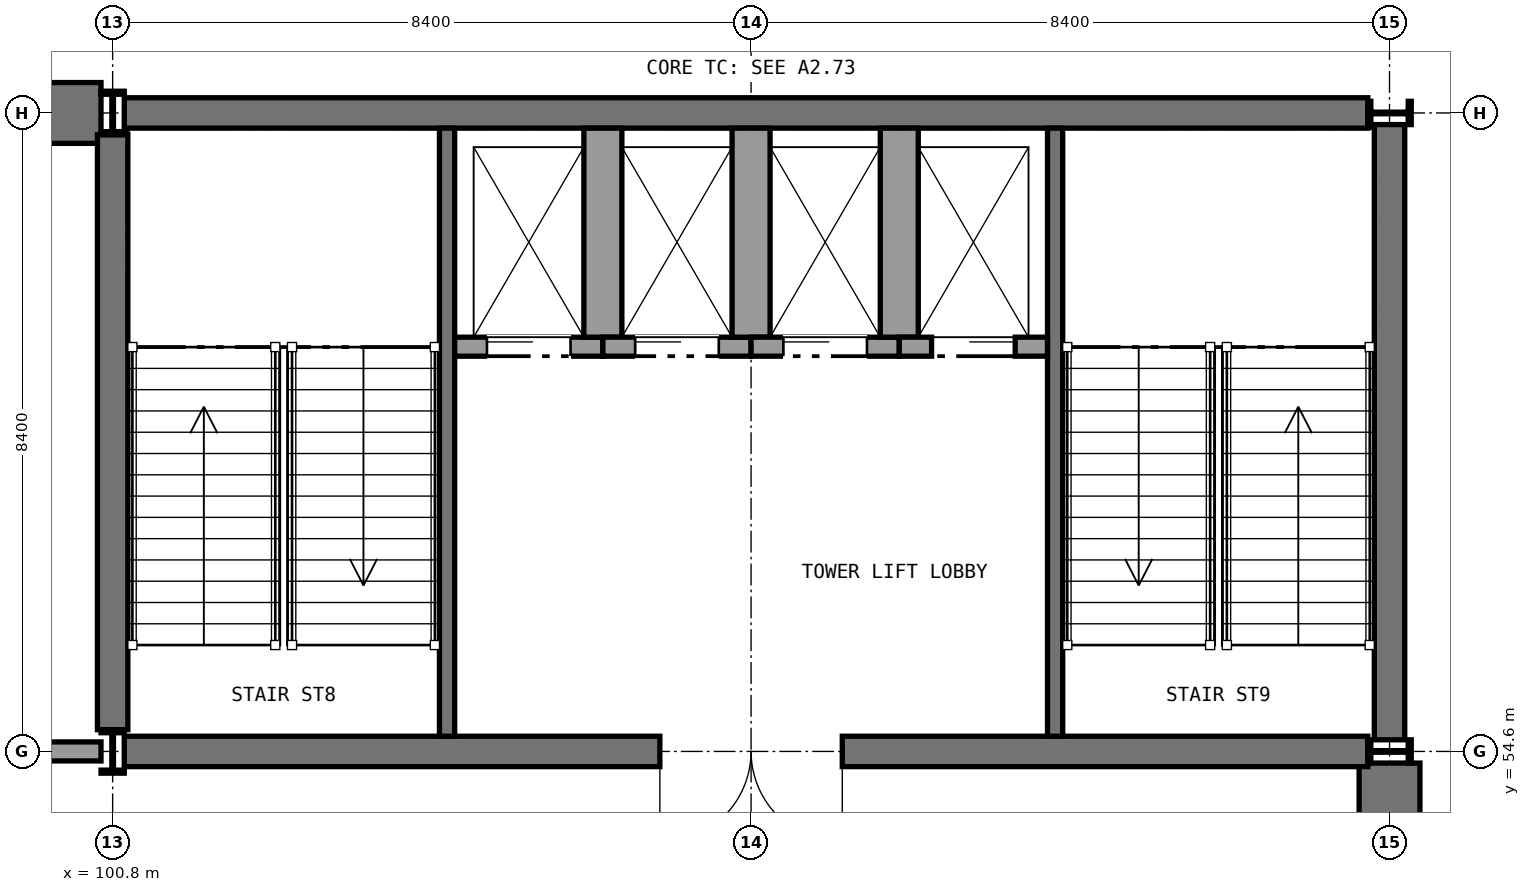
"""IFC4 building model, lengths in metres.
Left out: names, types, materials, properties, quantities, classifications, styles, units other than length and angle.
Written with IfcOpenShell. Run it as: python <this file> out.ifc"""

import sys

from ifc_helpers import new_model, si_unit, direction, frame, frame_2d, origin, origin_2d, place, context, subcontext, project, spatial, rectangle, i_section, extrude, element, fill, save


model = new_model("IFC4")
c1 = context("Model", 3, precision=1e-05, world=origin(), true_north=direction((0.0, 1.0)))
c2 = subcontext(c1, "Body", "Model", "MODEL_VIEW")
j1 = project(units=[si_unit("LENGTHUNIT", "METRE"), si_unit("PLANEANGLEUNIT", "RADIAN")], contexts=[c1])
p1 = place(None, origin())
s1 = spatial("IfcSite", under=j1, at=p1, CompositionType="ELEMENT")
p2 = place(p1, origin())
s2 = spatial("IfcBuilding", under=s1, at=p2, CompositionType="ELEMENT")
p3 = place(p2, frame((0.0, 0.0, -9.9)))
s3 = spatial("IfcBuildingStorey", under=s2, at=p3, CompositionType="ELEMENT", Elevation=-9.9)
for number, where, z_axis, x_axis in (
    (1, (92.4, 63.0, 0.0), (0.0, 0.0, 1.0), (1.0, 0.0, 0.0)),
    (2, (117.6, 46.2, 0.0), (0.0, 0.0, 1.0), (0.0, 1.0, 0.0)),
):
    element("IfcWall", number, at=place(p3, frame(where, z_axis=z_axis, x_axis=x_axis)), inside=s3, PredefinedType="SOLIDWALL", context=c2, shape_type="SweptSolid", body=[
        extrude(rectangle(XDim=8.247, YDim=0.8, at=frame_2d((4.124, 0.0))), origin(), (0.0, 0.0, 1.0), 4.65),
    ])
p4 = place(p3, frame((100.953, 63.0, 0.0), z_axis=(0.0, 0.0, 1.0), x_axis=(1.0, 0.0, 0.0)))
e3 = element("IfcWall", 3, at=p4, inside=s3, PredefinedType="SHEAR", context=c2, shape_type="SweptSolid", body=[
    extrude(rectangle(XDim=16.361, YDim=0.4, at=frame_2d((8.181, 0.0))), origin(), (0.0, 0.0, 1.0), 4.65),
])
p5 = place(p3, frame((100.953, 54.6, 0.0), z_axis=(0.0, 0.0, 1.0), x_axis=(1.0, 0.0, 0.0)))
e4 = element("IfcWall", 4, at=p5, inside=s3, PredefinedType="SHEAR", context=c2, shape_type="SweptSolid", body=[
    extrude(rectangle(XDim=16.361, YDim=0.4, at=frame_2d((8.181, 0.0))), origin(), (0.0, 0.0, 1.0), 4.65),
])
p6 = place(p5, frame((7.047, 0.0, 0.0)))
e5 = element("IfcOpeningElement", 5, at=p6, cuts=e4, PredefinedType="OPENING", context=c2, shape_type="SweptSolid", body=[
    extrude(rectangle(XDim=2.4, YDim=2.4, at=frame_2d((1.2, 1.2))), frame((0.0, 0.21, 0.0), z_axis=(0.0, -1.0, 0.0), x_axis=(1.0, 0.0, 0.0)), (0.0, 0.0, 1.0), 0.42),
])
p7 = place(p3, frame((100.8, 54.886, 0.0), z_axis=(0.0, 0.0, 1.0), x_axis=(0.0, 1.0, 0.0)))
e6 = element("IfcWall", 6, at=p7, inside=s3, PredefinedType="SHEAR", context=c2, shape_type="SweptSolid", body=[
    extrude(rectangle(XDim=7.828, YDim=0.4, at=frame_2d((3.914, 0.0))), origin(), (0.0, 0.0, 1.0), 4.65),
])
p8 = place(p3, frame((117.6, 54.753, 0.0), z_axis=(0.0, 0.0, 1.0), x_axis=(0.0, 1.0, 0.0)))
e7 = element("IfcWall", 7, at=p8, inside=s3, PredefinedType="SHEAR", context=c2, shape_type="SweptSolid", body=[
    extrude(rectangle(XDim=8.094, YDim=0.4, at=frame_2d((4.047, 0.0))), origin(), (0.0, 0.0, 1.0), 4.65),
])
for number, where, z_axis, x_axis in (
    (8, (100.8, 54.6, 0.0), (0.0, 0.0, 1.0), (1.0, 0.0, 0.0)),
    (9, (100.8, 63.0, 0.0), (0.0, 0.0, 1.0), (1.0, 0.0, 0.0)),
    (10, (117.6, 54.6, 0.0), (0.0, 0.0, 1.0), (0.0, 1.0, 0.0)),
    (11, (117.6, 63.0, 0.0), (0.0, 0.0, 1.0), (0.0, 1.0, 0.0)),
):
    element("IfcColumn", number, at=place(p3, frame(where, z_axis=z_axis, x_axis=x_axis)), inside=s3, PredefinedType="COLUMN", context=c2, shape_type="SweptSolid", body=[
        extrude(i_section(OverallWidth=0.306, OverallDepth=0.572, WebThickness=0.021, FlangeThickness=0.04, FilletRadius=0.027, at=origin_2d()), origin(), (0.0, 0.0, 1.0), 5.0),
    ])
p9 = place(p3, frame((92.553, 54.6, 0.0), z_axis=(0.0, 0.0, 1.0), x_axis=(1.0, 0.0, 0.0)))
e12 = element("IfcWall", 12, at=p9, inside=s3, PredefinedType="SOLIDWALL", context=c2, shape_type="SweptSolid", body=[
    extrude(rectangle(XDim=8.094, YDim=0.25, at=frame_2d((4.047, 0.0))), origin(), (0.0, 0.0, 1.0), 4.65),
])
p10 = place(p9, frame((3.35, 0.0, 0.0)))
e13 = element("IfcOpeningElement", 13, at=p10, cuts=e12, PredefinedType="OPENING", context=c2, shape_type="SweptSolid", body=[
    extrude(rectangle(XDim=1.6, YDim=2.2, at=frame_2d((0.8, 1.1))), frame((0.0, 0.135, 0.0), z_axis=(0.0, -1.0, 0.0), x_axis=(1.0, 0.0, 0.0)), (0.0, 0.0, 1.0), 0.27),
])
for number, where, z_axis, x_axis in (
    (14, (105.2, 62.8, 0.0), (0.0, 0.0, 1.0), (0.0, -1.0, 0.0)),
    (15, (113.2, 62.8, 0.0), (0.0, 0.0, 1.0), (0.0, -1.0, 0.0)),
):
    element("IfcWall", number, at=place(p3, frame(where, z_axis=z_axis, x_axis=x_axis)), inside=s3, PredefinedType="SHEAR", context=c2, shape_type="SweptSolid", body=[
        extrude(rectangle(XDim=8.0, YDim=0.2, at=frame_2d((4.0, 0.0))), origin(), (0.0, 0.0, 1.0), 4.65),
    ])
p11 = place(p3, frame((105.3, 59.925, -1.4), z_axis=(0.0, 0.0, 1.0), x_axis=(1.0, 0.0, 0.0)))
e16 = element("IfcWall", 16, at=p11, inside=s3, PredefinedType="SOLIDWALL", context=c2, shape_type="SweptSolid", body=[
    extrude(rectangle(XDim=1.95, YDim=0.25, at=frame_2d((0.975, 0.0))), origin(), (0.0, 0.0, 1.0), 6.4),
])
p12 = place(p11, frame((0.425, 0.0, 1.4)))
e17 = element("IfcOpeningElement", 17, at=p12, cuts=e16, PredefinedType="OPENING", context=c2, shape_type="SweptSolid", body=[
    extrude(rectangle(XDim=1.1, YDim=2.1, at=frame_2d((0.55, 1.05))), frame((0.0, 0.135, 0.0), z_axis=(0.0, -1.0, 0.0), x_axis=(1.0, 0.0, 0.0)), (0.0, 0.0, 1.0), 0.27),
])
p13 = place(p3, frame((107.25, 62.8, -1.4), z_axis=(0.0, 0.0, 1.0), x_axis=(0.0, -1.0, 0.0)))
e18 = element("IfcWall", 18, at=p13, inside=s3, PredefinedType="SOLIDWALL", context=c2, shape_type="SweptSolid", body=[
    extrude(rectangle(XDim=2.75, YDim=0.5, at=frame_2d((1.375, 0.0))), origin(), (0.0, 0.0, 1.0), 6.4),
])
p14 = place(p3, frame((107.25, 59.925, -1.4), z_axis=(0.0, 0.0, 1.0), x_axis=(1.0, 0.0, 0.0)))
e19 = element("IfcWall", 19, at=p14, inside=s3, PredefinedType="SOLIDWALL", context=c2, shape_type="SweptSolid", body=[
    extrude(rectangle(XDim=1.95, YDim=0.25, at=frame_2d((0.975, 0.0))), origin(), (0.0, 0.0, 1.0), 6.4),
])
p15 = place(p14, frame((0.425, 0.0, 1.4)))
e20 = element("IfcOpeningElement", 20, at=p15, cuts=e19, PredefinedType="OPENING", context=c2, shape_type="SweptSolid", body=[
    extrude(rectangle(XDim=1.1, YDim=2.1, at=frame_2d((0.55, 1.05))), frame((0.0, 0.135, 0.0), z_axis=(0.0, -1.0, 0.0), x_axis=(1.0, 0.0, 0.0)), (0.0, 0.0, 1.0), 0.27),
])
p16 = place(p3, frame((109.2, 62.8, -1.4), z_axis=(0.0, 0.0, 1.0), x_axis=(0.0, -1.0, 0.0)))
e21 = element("IfcWall", 21, at=p16, inside=s3, PredefinedType="SOLIDWALL", context=c2, shape_type="SweptSolid", body=[
    extrude(rectangle(XDim=2.75, YDim=0.5, at=frame_2d((1.375, 0.0))), origin(), (0.0, 0.0, 1.0), 6.4),
])
p17 = place(p3, frame((109.2, 59.925, -1.4), z_axis=(0.0, 0.0, 1.0), x_axis=(1.0, 0.0, 0.0)))
e22 = element("IfcWall", 22, at=p17, inside=s3, PredefinedType="SOLIDWALL", context=c2, shape_type="SweptSolid", body=[
    extrude(rectangle(XDim=1.95, YDim=0.25, at=frame_2d((0.975, 0.0))), origin(), (0.0, 0.0, 1.0), 6.4),
])
p18 = place(p17, frame((0.425, 0.0, 1.4)))
e23 = element("IfcOpeningElement", 23, at=p18, cuts=e22, PredefinedType="OPENING", context=c2, shape_type="SweptSolid", body=[
    extrude(rectangle(XDim=1.1, YDim=2.1, at=frame_2d((0.55, 1.05))), frame((0.0, 0.135, 0.0), z_axis=(0.0, -1.0, 0.0), x_axis=(1.0, 0.0, 0.0)), (0.0, 0.0, 1.0), 0.27),
])
p19 = place(p3, frame((111.15, 62.8, -1.4), z_axis=(0.0, 0.0, 1.0), x_axis=(0.0, -1.0, 0.0)))
e24 = element("IfcWall", 24, at=p19, inside=s3, PredefinedType="SOLIDWALL", context=c2, shape_type="SweptSolid", body=[
    extrude(rectangle(XDim=2.75, YDim=0.5, at=frame_2d((1.375, 0.0))), origin(), (0.0, 0.0, 1.0), 6.4),
])
p20 = place(p3, frame((111.15, 59.925, -1.4), z_axis=(0.0, 0.0, 1.0), x_axis=(1.0, 0.0, 0.0)))
e25 = element("IfcWall", 25, at=p20, inside=s3, PredefinedType="SOLIDWALL", context=c2, shape_type="SweptSolid", body=[
    extrude(rectangle(XDim=1.95, YDim=0.25, at=frame_2d((0.975, 0.0))), origin(), (0.0, 0.0, 1.0), 6.4),
])
p21 = place(p20, frame((0.425, 0.0, 1.4)))
e26 = element("IfcOpeningElement", 26, at=p21, cuts=e25, PredefinedType="OPENING", context=c2, shape_type="SweptSolid", body=[
    extrude(rectangle(XDim=1.1, YDim=2.1, at=frame_2d((0.55, 1.05))), frame((0.0, 0.135, 0.0), z_axis=(0.0, -1.0, 0.0), x_axis=(1.0, 0.0, 0.0)), (0.0, 0.0, 1.0), 0.27),
])
p22 = place(p12, frame((1.1, 0.0, 0.0), z_axis=(0.0, 0.0, 1.0), x_axis=(-1.0, 0.0, 0.0)))
e27 = element("IfcDoor", 27, at=p22, inside=s3, OperationType="SLIDING_TO_RIGHT", PredefinedType="DOOR", context=c2, shape_type="SweptSolid", body=[
    extrude(rectangle(XDim=1.1, YDim=2.1, at=frame_2d((0.55, 1.05))), frame((0.0, 0.025, 0.0), z_axis=(0.0, -1.0, 0.0), x_axis=(1.0, 0.0, 0.0)), (0.0, 0.0, 1.0), 0.05),
])
fill(e17, e27)
p23 = place(p15, frame((1.1, 0.0, 0.0), z_axis=(0.0, 0.0, 1.0), x_axis=(-1.0, 0.0, 0.0)))
e28 = element("IfcDoor", 28, at=p23, inside=s3, OperationType="SLIDING_TO_RIGHT", PredefinedType="DOOR", context=c2, shape_type="SweptSolid", body=[
    extrude(rectangle(XDim=1.1, YDim=2.1, at=frame_2d((0.55, 1.05))), frame((0.0, 0.025, 0.0), z_axis=(0.0, -1.0, 0.0), x_axis=(1.0, 0.0, 0.0)), (0.0, 0.0, 1.0), 0.05),
])
fill(e20, e28)
p24 = place(p18, frame((1.1, 0.0, 0.0), z_axis=(0.0, 0.0, 1.0), x_axis=(-1.0, 0.0, 0.0)))
e29 = element("IfcDoor", 29, at=p24, inside=s3, OperationType="SLIDING_TO_RIGHT", PredefinedType="DOOR", context=c2, shape_type="SweptSolid", body=[
    extrude(rectangle(XDim=1.1, YDim=2.1, at=frame_2d((0.55, 1.05))), frame((0.0, 0.025, 0.0), z_axis=(0.0, -1.0, 0.0), x_axis=(1.0, 0.0, 0.0)), (0.0, 0.0, 1.0), 0.05),
])
fill(e23, e29)
p25 = place(p21, frame((1.1, 0.0, 0.0), z_axis=(0.0, 0.0, 1.0), x_axis=(-1.0, 0.0, 0.0)))
e30 = element("IfcDoor", 30, at=p25, inside=s3, OperationType="SLIDING_TO_LEFT", PredefinedType="DOOR", context=c2, shape_type="SweptSolid", body=[
    extrude(rectangle(XDim=1.1, YDim=2.1, at=frame_2d((0.55, 1.05))), frame((0.0, 0.025, 0.0), z_axis=(0.0, -1.0, 0.0), x_axis=(1.0, 0.0, 0.0)), (0.0, 0.0, 1.0), 0.05),
])
fill(e26, e30)
p26 = place(p6, frame((2.4, 0.0, 0.0), z_axis=(0.0, 0.0, 1.0), x_axis=(-1.0, 0.0, 0.0)))
e31 = element("IfcDoor", 31, at=p26, inside=s3, OperationType="DOUBLE_DOOR_SINGLE_SWING", PredefinedType="DOOR", context=c2, shape_type="SweptSolid", body=[
    extrude(rectangle(XDim=2.4, YDim=2.4, at=frame_2d((1.2, 1.2))), frame((0.0, 0.025, 0.0), z_axis=(0.0, -1.0, 0.0), x_axis=(1.0, 0.0, 0.0)), (0.0, 0.0, 1.0), 0.05),
])
fill(e5, e31)
save(model, sys.argv[1])
